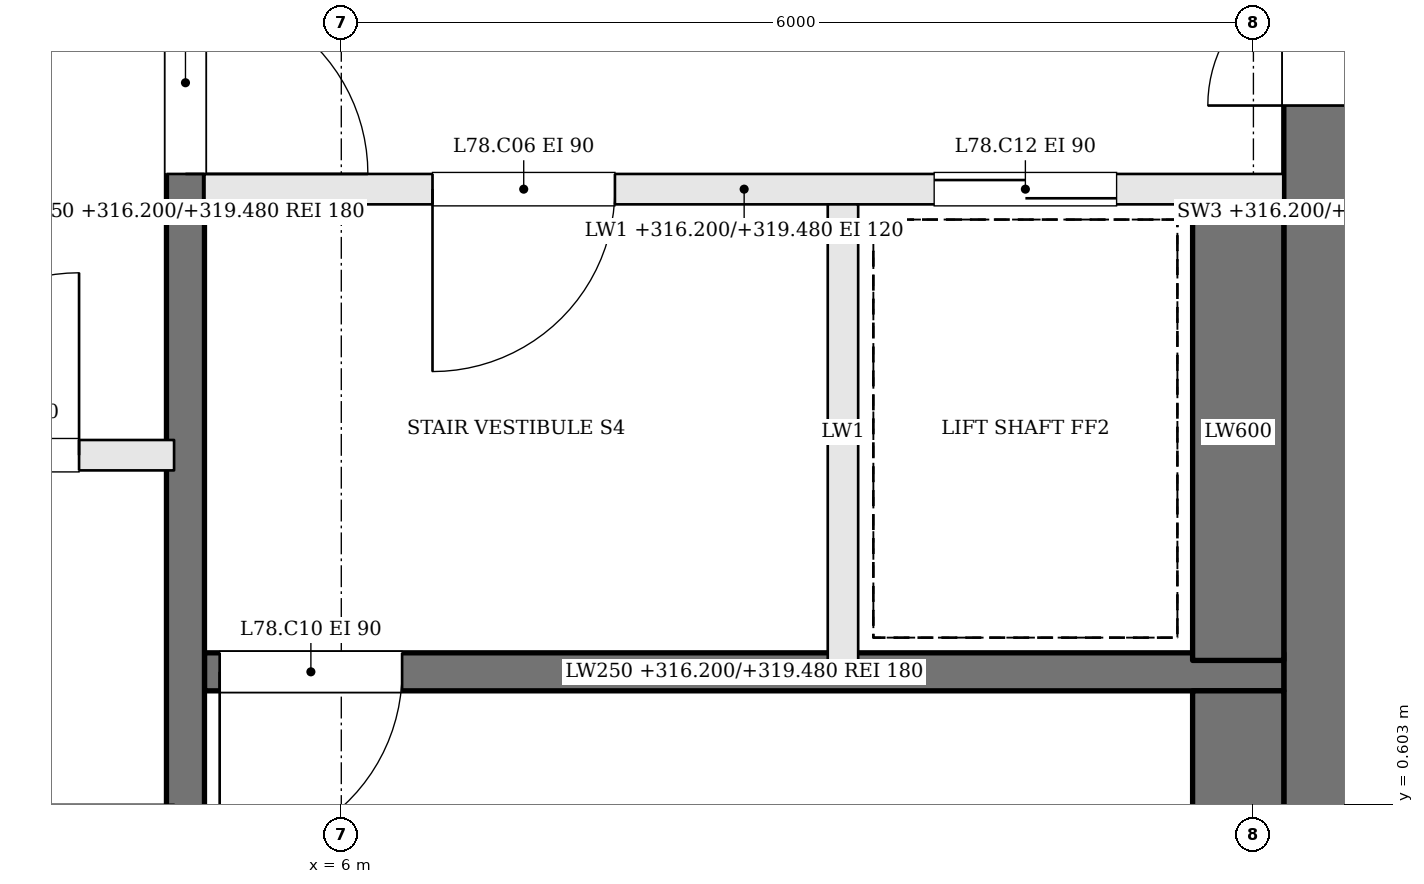
"""IFC4 building model, lengths in metres.
Left out: names, types, materials, properties, quantities, classifications, styles, units other than length and angle.
Written with IfcOpenShell. Run it as: python <this file> out.ifc"""

import sys

from ifc_helpers import new_model, si_unit, direction, frame, frame_2d, origin, place, context, subcontext, project, spatial, rectangle, extrude, element, fill, save


model = new_model("IFC4")
c1 = context("Model", 3, precision=1e-05, world=origin(), true_north=direction((0.0, 1.0)))
c2 = subcontext(c1, "Body", "Model", "MODEL_VIEW")
j1 = project(units=[si_unit("LENGTHUNIT", "METRE"), si_unit("PLANEANGLEUNIT", "RADIAN")], contexts=[c1])
p1 = place(None, origin())
s1 = spatial("IfcSite", under=j1, at=p1, CompositionType="ELEMENT")
p2 = place(p1, origin())
s2 = spatial("IfcBuilding", under=s1, at=p2, CompositionType="ELEMENT")
p3 = place(p2, frame((0.0, 0.0, 316.2)))
s3 = spatial("IfcBuildingStorey", under=s2, at=p3, CompositionType="ELEMENT", Elevation=316.2)
p4 = place(p3, frame((12.6, -2.2, 0.0), z_axis=(0.0, 0.0, 1.0), x_axis=(0.0, 1.0, 0.0)))
e1 = element("IfcWall", 1, at=p4, inside=s3, PredefinedType="SHEAR", context=c2, shape_type="SweptSolid", body=[
    extrude(rectangle(XDim=13.4, YDim=0.8, at=frame_2d((6.7, 0.0))), origin(), (0.0, 0.0, 1.0), 4.0),
])
p5 = place(p4, frame((7.4, 0.0, 0.0)))
e2 = element("IfcOpeningElement", 2, at=p5, cuts=e1, PredefinedType="OPENING", context=c2, shape_type="SweptSolid", body=[
    extrude(rectangle(XDim=1.8, YDim=2.1, at=frame_2d((0.9, 1.05))), frame((0.0, 0.41, 0.0), z_axis=(0.0, -1.0, 0.0), x_axis=(1.0, 0.0, 0.0)), (0.0, 0.0, 1.0), 0.82),
])
p6 = place(p3, frame((12.2, 4.65, 0.0), z_axis=(0.0, 0.0, 1.0), x_axis=(-1.0, 0.0, 0.0)))
e3 = element("IfcWall", 3, at=p6, inside=s3, PredefinedType="SOLIDWALL", context=c2, shape_type="SweptSolid", body=[
    extrude(rectangle(XDim=7.1, YDim=0.2, at=frame_2d((3.55, 0.0))), origin(), (0.0, 0.0, 1.0), 3.28),
])
p7 = place(p6, frame((4.4, 0.0, 0.0)))
e4 = element("IfcOpeningElement", 4, at=p7, cuts=e3, PredefinedType="OPENING", context=c2, shape_type="SweptSolid", body=[
    extrude(rectangle(XDim=1.2, YDim=2.1, at=frame_2d((0.6, 1.05))), frame((0.0, 0.11, 0.0), z_axis=(0.0, -1.0, 0.0), x_axis=(1.0, 0.0, 0.0)), (0.0, 0.0, 1.0), 0.22),
])
p8 = place(p6, frame((1.1, 0.0, 0.0)))
e5 = element("IfcOpeningElement", 5, at=p8, cuts=e3, PredefinedType="OPENING", context=c2, shape_type="SweptSolid", body=[
    extrude(rectangle(XDim=1.2, YDim=2.1, at=frame_2d((0.6, 1.05))), frame((0.0, 0.11, 0.0), z_axis=(0.0, -1.0, 0.0), x_axis=(1.0, 0.0, 0.0)), (0.0, 0.0, 1.0), 0.22),
])
p9 = place(p3, frame((12.2, 1.475, 0.0), z_axis=(0.0, 0.0, 1.0), x_axis=(-1.0, 0.0, 0.0)))
e6 = element("IfcWall", 6, at=p9, inside=s3, PredefinedType="SOLIDWALL", context=c2, shape_type="SweptSolid", body=[
    extrude(rectangle(XDim=7.1, YDim=0.25, at=frame_2d((3.55, 0.0))), origin(), (0.0, 0.0, 1.0), 3.28),
])
p10 = place(p9, frame((5.8, 0.0, 0.0)))
e7 = element("IfcOpeningElement", 7, at=p10, cuts=e6, PredefinedType="OPENING", context=c2, shape_type="SweptSolid", body=[
    extrude(rectangle(XDim=1.2, YDim=2.1, at=frame_2d((0.6, 1.05))), frame((0.0, 0.135, 0.0), z_axis=(0.0, -1.0, 0.0), x_axis=(1.0, 0.0, 0.0)), (0.0, 0.0, 1.0), 0.27),
])
p11 = place(p3, frame((9.3, 4.55, 0.0), z_axis=(0.0, 0.0, 1.0), x_axis=(0.0, -1.0, 0.0)))
e8 = element("IfcWall", 8, at=p11, inside=s3, PredefinedType="SOLIDWALL", context=c2, shape_type="SweptSolid", body=[
    extrude(rectangle(XDim=3.0, YDim=0.2, at=frame_2d((1.5, 0.0))), origin(), (0.0, 0.0, 1.0), 3.28),
])
p12 = place(p3, frame((4.975, 11.2, 0.0), z_axis=(0.0, 0.0, 1.0), x_axis=(0.0, -1.0, 0.0)))
e9 = element("IfcWall", 9, at=p12, inside=s3, PredefinedType="SOLIDWALL", context=c2, shape_type="SweptSolid", body=[
    extrude(rectangle(XDim=13.4, YDim=0.25, at=frame_2d((6.7, 0.0))), origin(), (0.0, 0.0, 1.0), 3.28),
])
p13 = place(p12, frame((5.25, 0.0, 0.0)))
e10 = element("IfcOpeningElement", 10, at=p13, cuts=e9, PredefinedType="OPENING", context=c2, shape_type="SweptSolid", body=[
    extrude(rectangle(XDim=1.2, YDim=2.1, at=frame_2d((0.6, 1.05))), frame((0.0, 0.135, 0.0), z_axis=(0.0, -1.0, 0.0), x_axis=(1.0, 0.0, 0.0)), (0.0, 0.0, 1.0), 0.27),
])
p14 = place(p3, frame((11.9, 4.55, 0.0), z_axis=(0.0, 0.0, 1.0), x_axis=(0.0, -1.0, 0.0)))
e11 = element("IfcWall", 11, at=p14, inside=s3, PredefinedType="SOLIDWALL", context=c2, shape_type="SweptSolid", body=[
    extrude(rectangle(XDim=3.0, YDim=0.6, at=frame_2d((1.5, 0.0))), origin(), (0.0, 0.0, 1.0), 3.28),
])
p15 = place(p3, frame((11.9, 1.35, 0.0), z_axis=(0.0, 0.0, 1.0), x_axis=(0.0, -1.0, 0.0)))
e12 = element("IfcWall", 12, at=p15, inside=s3, PredefinedType="SOLIDWALL", context=c2, shape_type="SweptSolid", body=[
    extrude(rectangle(XDim=2.95, YDim=0.6, at=frame_2d((1.475, 0.0))), origin(), (0.0, 0.0, 1.0), 3.28),
])
p16 = place(p3, frame((-4.9, 2.9, 0.0), z_axis=(0.0, 0.0, 1.0), x_axis=(1.0, 0.0, 0.0)))
e13 = element("IfcWall", 13, at=p16, inside=s3, PredefinedType="SOLIDWALL", context=c2, shape_type="SweptSolid", body=[
    extrude(rectangle(XDim=9.8, YDim=0.2, at=frame_2d((4.9, 0.0))), origin(), (0.0, 0.0, 1.0), 3.28),
])
p17 = place(p16, frame((0.725, 0.0, 0.0)))
e14 = element("IfcOpeningElement", 14, at=p17, cuts=e13, PredefinedType="OPENING", context=c2, shape_type="SweptSolid", body=[
    extrude(rectangle(XDim=1.0, YDim=2.1, at=frame_2d((0.5, 1.05))), frame((0.0, 0.11, 0.0), z_axis=(0.0, -1.0, 0.0), x_axis=(1.0, 0.0, 0.0)), (0.0, 0.0, 1.0), 0.22),
])
p18 = place(p16, frame((3.175, 0.0, 0.0)))
e15 = element("IfcOpeningElement", 15, at=p18, cuts=e13, PredefinedType="OPENING", context=c2, shape_type="SweptSolid", body=[
    extrude(rectangle(XDim=1.0, YDim=2.1, at=frame_2d((0.5, 1.05))), frame((0.0, 0.11, 0.0), z_axis=(0.0, -1.0, 0.0), x_axis=(1.0, 0.0, 0.0)), (0.0, 0.0, 1.0), 0.22),
])
p19 = place(p16, frame((5.525, 0.0, 0.0)))
e16 = element("IfcOpeningElement", 16, at=p19, cuts=e13, PredefinedType="OPENING", context=c2, shape_type="SweptSolid", body=[
    extrude(rectangle(XDim=1.2, YDim=2.1, at=frame_2d((0.6, 1.05))), frame((0.0, 0.11, 0.0), z_axis=(0.0, -1.0, 0.0), x_axis=(1.0, 0.0, 0.0)), (0.0, 0.0, 1.0), 0.22),
])
p20 = place(p16, frame((7.975, 0.0, 0.0)))
e17 = element("IfcOpeningElement", 17, at=p20, cuts=e13, PredefinedType="OPENING", context=c2, shape_type="SweptSolid", body=[
    extrude(rectangle(XDim=1.2, YDim=2.1, at=frame_2d((0.6, 1.05))), frame((0.0, 0.11, 0.0), z_axis=(0.0, -1.0, 0.0), x_axis=(1.0, 0.0, 0.0)), (0.0, 0.0, 1.0), 0.22),
])
p21 = place(p5, origin())
e18 = element("IfcDoor", 18, at=p21, inside=s3, OperationType="DOUBLE_DOOR_SINGLE_SWING", PredefinedType="DOOR", context=c2, shape_type="SweptSolid", body=[
    extrude(rectangle(XDim=1.8, YDim=2.1, at=frame_2d((0.9, 1.05))), frame((0.0, 0.025, 0.0), z_axis=(0.0, -1.0, 0.0), x_axis=(1.0, 0.0, 0.0)), (0.0, 0.0, 1.0), 0.05),
])
fill(e2, e18)
p22 = place(p13, origin())
e19 = element("IfcDoor", 19, at=p22, inside=s3, OperationType="SINGLE_SWING_RIGHT", PredefinedType="DOOR", context=c2, shape_type="SweptSolid", body=[
    extrude(rectangle(XDim=1.2, YDim=2.1, at=frame_2d((0.6, 1.05))), frame((0.0, 0.025, 0.0), z_axis=(0.0, -1.0, 0.0), x_axis=(1.0, 0.0, 0.0)), (0.0, 0.0, 1.0), 0.05),
])
fill(e10, e19)
p23 = place(p7, origin())
e20 = element("IfcDoor", 20, at=p23, inside=s3, OperationType="SINGLE_SWING_RIGHT", PredefinedType="DOOR", context=c2, shape_type="SweptSolid", body=[
    extrude(rectangle(XDim=1.2, YDim=2.1, at=frame_2d((0.6, 1.05))), frame((0.0, 0.025, 0.0), z_axis=(0.0, -1.0, 0.0), x_axis=(1.0, 0.0, 0.0)), (0.0, 0.0, 1.0), 0.05),
])
fill(e4, e20)
p24 = place(p10, origin())
e21 = element("IfcDoor", 21, at=p24, inside=s3, OperationType="SINGLE_SWING_RIGHT", PredefinedType="DOOR", context=c2, shape_type="SweptSolid", body=[
    extrude(rectangle(XDim=1.2, YDim=2.1, at=frame_2d((0.6, 1.05))), frame((0.0, 0.025, 0.0), z_axis=(0.0, -1.0, 0.0), x_axis=(1.0, 0.0, 0.0)), (0.0, 0.0, 1.0), 0.05),
])
fill(e7, e21)
p25 = place(p8, origin())
e22 = element("IfcDoor", 22, at=p25, inside=s3, OperationType="SLIDING_TO_RIGHT", PredefinedType="DOOR", context=c2, shape_type="SweptSolid", body=[
    extrude(rectangle(XDim=1.2, YDim=2.1, at=frame_2d((0.6, 1.05))), frame((0.0, 0.025, 0.0), z_axis=(0.0, -1.0, 0.0), x_axis=(1.0, 0.0, 0.0)), (0.0, 0.0, 1.0), 0.05),
])
fill(e5, e22)
p26 = place(p20, origin())
e23 = element("IfcDoor", 23, at=p26, inside=s3, OperationType="SINGLE_SWING_RIGHT", PredefinedType="DOOR", context=c2, shape_type="SweptSolid", body=[
    extrude(rectangle(XDim=1.2, YDim=2.1, at=frame_2d((0.6, 1.05))), frame((0.0, 0.025, 0.0), z_axis=(0.0, -1.0, 0.0), x_axis=(1.0, 0.0, 0.0)), (0.0, 0.0, 1.0), 0.05),
])
fill(e17, e23)
save(model, sys.argv[1])
